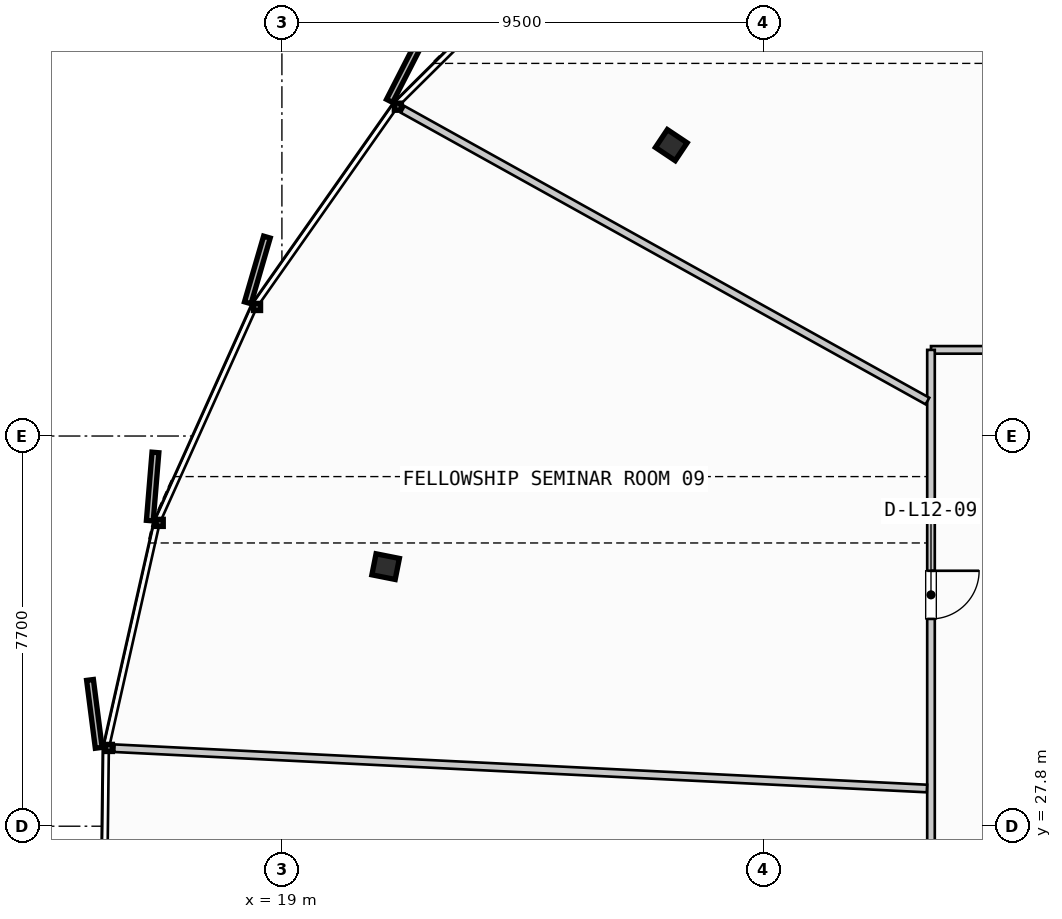
"""IFC4 building model, lengths in metres.
Left out: names, types, materials, properties, quantities, classifications, styles, units other than length and angle.
Written with IfcOpenShell. Run it as: python <this file> out.ifc"""

import sys

from ifc_helpers import new_model, si_unit, direction, frame, frame_2d, origin, origin_2d, place, context, subcontext, project, spatial, rectangle, i_section, extrude, source, transform, mapped, element, fill, save


model = new_model("IFC4")
c1 = context("Model", 3, precision=1e-05, world=origin(), true_north=direction((0.0, 1.0)))
c2 = subcontext(c1, "Body", "Model", "MODEL_VIEW")
j1 = project(units=[si_unit("LENGTHUNIT", "METRE"), si_unit("PLANEANGLEUNIT", "RADIAN")], contexts=[c1])
p1 = place(None, origin())
s1 = spatial("IfcSite", under=j1, at=p1, CompositionType="ELEMENT")
p2 = place(p1, origin())
s2 = spatial("IfcBuilding", under=s1, at=p2, CompositionType="ELEMENT")
p3 = place(p2, frame((0.0, 0.0, 52.4)))
s3 = spatial("IfcBuildingStorey", under=s2, at=p3, CompositionType="ELEMENT", Elevation=52.4)
m1 = source(origin(), c2, "Body", "SweptSolid", [
    extrude(i_section(OverallWidth=0.423, OverallDepth=0.469, WebThickness=0.051, FlangeThickness=0.081, FilletRadius=0.015, at=origin_2d()), origin(), (0.0, 0.0, 1.0), 3.55),
])
for number, where, z_axis, x_axis in (
    (1, (26.685, 41.241, 0.0), (0.0, 0.0, 1.0), (-0.831, 0.556, 0.0)),
    (2, (21.047, 32.923, 0.0), (0.0, 0.0, 1.0), (-0.981, 0.195, 0.0)),
):
    element("IfcColumn", number, at=place(p3, frame(where, z_axis=z_axis, x_axis=x_axis)), inside=s3, PredefinedType="COLUMN", context=c2, shape_type="MappedRepresentation", body=[
        mapped(m1, transform((0.0, 0.0, 0.0), scale=1.0)),
    ])
p4 = place(p3, frame((61.79, 37.2, 0.0), z_axis=(0.0, 0.0, 1.0), x_axis=(-1.0, 0.0, 0.0)))
e3 = element("IfcWall", 3, at=p4, inside=s3, PredefinedType="PARTITIONING", context=c2, shape_type="SweptSolid", body=[
    extrude(rectangle(XDim=29.98, YDim=0.15, at=frame_2d((14.99, 0.0))), origin(), (0.0, 0.0, 1.0), 2.645),
])
p5 = place(p4, frame((5.708, 0.0, 0.0)))
e4 = element("IfcOpeningElement", 4, at=p5, cuts=e3, PredefinedType="OPENING", context=c2, shape_type="SweptSolid", body=[
    extrude(rectangle(XDim=0.95, YDim=2.15, at=frame_2d((0.475, 1.075))), frame((0.0, 0.085, 0.0), z_axis=(0.0, -1.0, 0.0), x_axis=(1.0, 0.0, 0.0)), (0.0, 0.0, 1.0), 0.17),
])
p6 = place(p4, frame((14.397, 0.0, 0.0)))
e5 = element("IfcOpeningElement", 5, at=p6, cuts=e3, PredefinedType="OPENING", context=c2, shape_type="SweptSolid", body=[
    extrude(rectangle(XDim=0.95, YDim=2.15, at=frame_2d((0.475, 1.075))), frame((0.0, 0.085, 0.0), z_axis=(0.0, -1.0, 0.0), x_axis=(1.0, 0.0, 0.0)), (0.0, 0.0, 1.0), 0.17),
])
p7 = place(p4, frame((23.206, 0.0, 0.0)))
e6 = element("IfcOpeningElement", 6, at=p7, cuts=e3, PredefinedType="OPENING", context=c2, shape_type="SweptSolid", body=[
    extrude(rectangle(XDim=0.95, YDim=2.15, at=frame_2d((0.475, 1.075))), frame((0.0, 0.085, 0.0), z_axis=(0.0, -1.0, 0.0), x_axis=(1.0, 0.0, 0.0)), (0.0, 0.0, 1.0), 0.17),
])
p8 = place(p3, frame((31.81, 37.2, 0.0), z_axis=(0.0, 0.0, 1.0), x_axis=(0.0, -1.0, 0.0)))
e7 = element("IfcWall", 7, at=p8, inside=s3, PredefinedType="PARTITIONING", context=c2, shape_type="SweptSolid", body=[
    extrude(rectangle(XDim=19.22, YDim=0.15, at=frame_2d((9.61, 0.0))), origin(), (0.0, 0.0, 1.0), 2.645),
])
p9 = place(p8, frame((4.359, 0.0, 0.0)))
e8 = element("IfcOpeningElement", 8, at=p9, cuts=e7, PredefinedType="OPENING", context=c2, shape_type="SweptSolid", body=[
    extrude(rectangle(XDim=0.95, YDim=2.15, at=frame_2d((0.475, 1.075))), frame((0.0, 0.085, 0.0), z_axis=(0.0, -1.0, 0.0), x_axis=(1.0, 0.0, 0.0)), (0.0, 0.0, 1.0), 0.17),
])
p10 = place(p8, frame((13.033, 0.0, 0.0)))
e9 = element("IfcOpeningElement", 9, at=p10, cuts=e7, PredefinedType="OPENING", context=c2, shape_type="SweptSolid", body=[
    extrude(rectangle(XDim=0.95, YDim=2.15, at=frame_2d((0.475, 1.075))), frame((0.0, 0.085, 0.0), z_axis=(0.0, -1.0, 0.0), x_axis=(1.0, 0.0, 0.0)), (0.0, 0.0, 1.0), 0.17),
])
p11 = place(p3, frame((31.74, 36.19, 0.0), z_axis=(0.0, 0.0, 1.0), x_axis=(-0.87407755514, 0.48578640121, 0.0)))
e10 = element("IfcWall", 10, at=p11, inside=s3, PredefinedType="PARTITIONING", context=c2, shape_type="SweptSolid", body=[
    extrude(rectangle(XDim=11.847, YDim=0.15, at=frame_2d((5.923, 0.0))), origin(), (0.0, 0.0, 1.0), 2.645),
])
p12 = place(p3, frame((31.73, 28.544, 0.0), z_axis=(0.0, 0.0, 1.0), x_axis=(-0.998771265113, 0.049557643048, 0.0)))
e11 = element("IfcWall", 11, at=p12, inside=s3, PredefinedType="PARTITIONING", context=c2, shape_type="SweptSolid", body=[
    extrude(rectangle(XDim=16.055, YDim=0.15, at=frame_2d((8.028, 0.0))), origin(), (0.0, 0.0, 1.0), 2.645),
])
m2 = source(origin(), c2, "Body", "SweptSolid", [
    extrude(rectangle(XDim=0.95, YDim=2.15, at=frame_2d((0.475, 1.075))), frame((0.0, 0.025, 0.0), z_axis=(0.0, -1.0, 0.0), x_axis=(1.0, 0.0, 0.0)), (0.0, 0.0, 1.0), 0.05),
])
p13 = place(p9, origin())
e12 = element("IfcDoor", 12, at=p13, inside=s3, OperationType="SINGLE_SWING_LEFT", PredefinedType="DOOR", context=c2, shape_type="MappedRepresentation", body=[
    mapped(m2, transform((0.0, 0.0, 0.0), scale=1.0)),
])
fill(e8, e12)
save(model, sys.argv[1])
